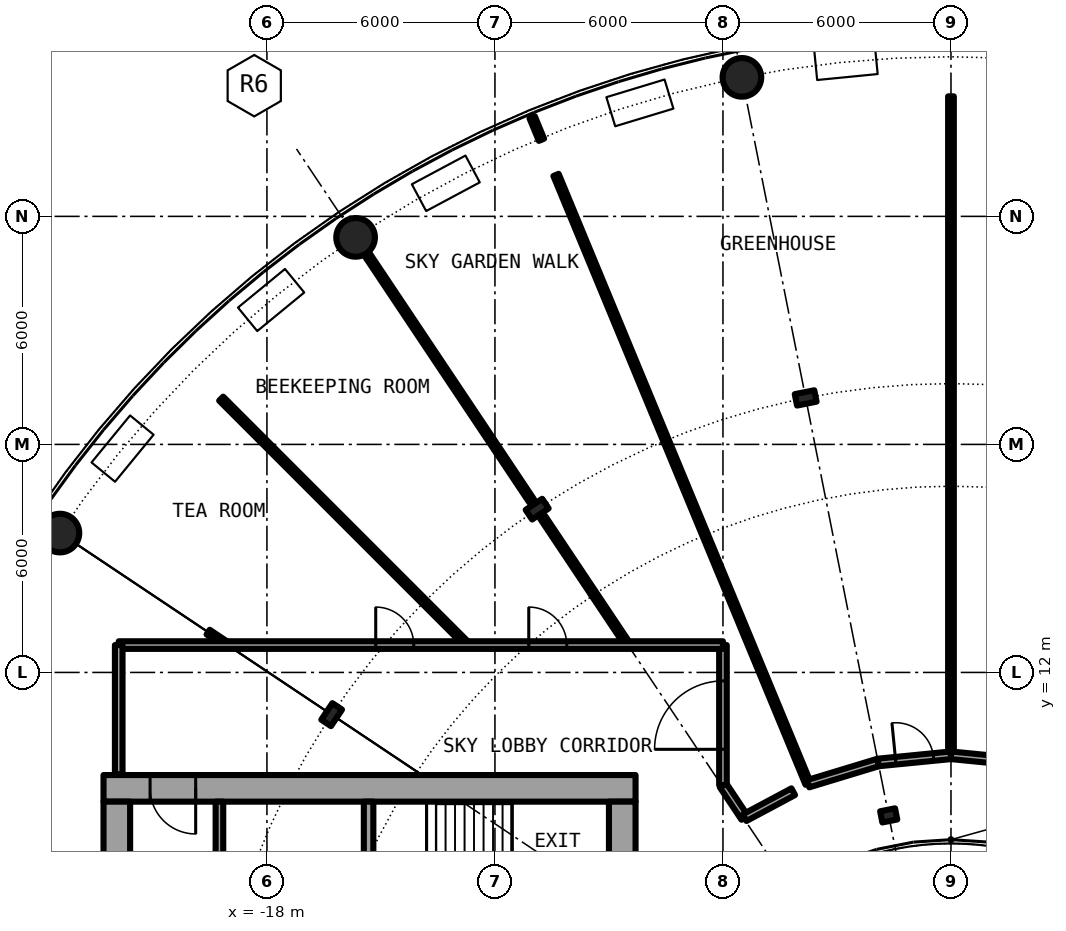
"""IFC4 building model, lengths in metres.
Left out: names, types, materials, properties, quantities, classifications, styles, units other than length and angle.
Written with IfcOpenShell. Run it as: python <this file> out.ifc"""

import sys

from ifc_helpers import new_model, si_unit, direction, frame, frame_2d, origin, origin_2d, place, context, subcontext, project, spatial, rectangle, hollow_circle, i_section, extrude, element, fill, save


model = new_model("IFC4")
c1 = context("Model", 3, precision=1e-05, world=origin(), true_north=direction((0.0, 1.0)))
c2 = subcontext(c1, "Body", "Model", "MODEL_VIEW")
j1 = project(units=[si_unit("LENGTHUNIT", "METRE"), si_unit("PLANEANGLEUNIT", "RADIAN")], contexts=[c1])
p1 = place(None, origin())
s1 = spatial("IfcSite", under=j1, at=p1, CompositionType="ELEMENT")
p2 = place(p1, origin())
s2 = spatial("IfcBuilding", under=s1, at=p2, CompositionType="ELEMENT")
p3 = place(p2, frame((0.0, 0.0, 97.15)))
s3 = spatial("IfcBuildingStorey", under=s2, at=p3, CompositionType="ELEMENT", Elevation=97.15)
for number, where, z_axis, x_axis in (
    (1, (-5.501, 27.658, 0.0), (0.0, 0.0, 1.0), (1.0, 0.0, 0.0)),
    (2, (-15.667, 23.448, 0.0), (0.0, 0.0, 1.0), (1.0, 0.0, 0.0)),
    (3, (-23.448, 15.667, 0.0), (0.0, 0.0, 1.0), (1.0, 0.0, 0.0)),
):
    element("IfcColumn", number, at=place(p3, frame(where, z_axis=z_axis, x_axis=x_axis)), inside=s3, PredefinedType="COLUMN", context=c2, shape_type="SweptSolid", body=[
        extrude(hollow_circle(Radius=0.508, WallThickness=0.04, at=origin_2d()), origin(), (0.0, 0.0, 1.0), 6.1),
    ])
for number, where, z_axis, x_axis in (
    (4, (-3.824, 19.223, 0.0), (0.0, 0.0, 1.0), (-0.195, 0.981, 0.0)),
    (5, (-10.889, 16.297, 0.0), (0.0, 0.0, 1.0), (-0.556, 0.831, 0.0)),
    (6, (-16.297, 10.889, 0.0), (0.0, 0.0, 1.0), (-0.831, 0.556, 0.0)),
):
    element("IfcColumn", number, at=place(p3, frame(where, z_axis=z_axis, x_axis=x_axis)), inside=s3, PredefinedType="COLUMN", context=c2, shape_type="SweptSolid", body=[
        extrude(i_section(OverallWidth=0.306, OverallDepth=0.524, WebThickness=0.021, FlangeThickness=0.04, FilletRadius=0.027, at=origin_2d()), origin(), (0.0, 0.0, 1.0), 6.1),
    ])
p4 = place(p3, frame((-1.639, 8.239, 0.0), z_axis=(0.0, 0.0, 1.0), x_axis=(-0.195090322016, 0.980785280403, 0.0)))
e7 = element("IfcColumn", 7, at=p4, inside=s3, PredefinedType="COLUMN", context=c2, shape_type="SweptSolid", body=[
    extrude(i_section(OverallWidth=0.3, OverallDepth=0.4, WebThickness=0.013, FlangeThickness=0.024, FilletRadius=0.027, at=origin_2d()), origin(), (0.0, 0.0, 1.0), 6.1),
])
p5 = place(p3, frame((-8.3, 8.95, 0.0), z_axis=(0.0, 0.0, 1.0), x_axis=(-1.0, 0.0, 0.0)))
e8 = element("IfcWall", 8, at=p5, inside=s3, PredefinedType="SHEAR", context=c2, shape_type="SweptSolid", body=[
    extrude(rectangle(XDim=14.0, YDim=0.7, at=frame_2d((7.0, 0.0))), origin(), (0.0, 0.0, 1.0), 6.1),
])
p6 = place(p5, frame((11.575, 0.0, 0.0)))
e9 = element("IfcOpeningElement", 9, at=p6, cuts=e8, PredefinedType="OPENING", context=c2, shape_type="SweptSolid", body=[
    extrude(rectangle(XDim=1.2, YDim=2.3, at=frame_2d((0.6, 1.15))), frame((0.0, 0.36, 0.0), z_axis=(0.0, -1.0, 0.0), x_axis=(1.0, 0.0, 0.0)), (0.0, 0.0, 1.0), 0.72),
])
p7 = place(p3, frame((-21.95, -8.6, 0.0), z_axis=(0.0, 0.0, 1.0), x_axis=(0.0, 1.0, 0.0)))
e10 = element("IfcWall", 10, at=p7, inside=s3, PredefinedType="SHEAR", context=c2, shape_type="SweptSolid", body=[
    extrude(rectangle(XDim=17.2, YDim=0.7, at=frame_2d((8.6, 0.0))), origin(), (0.0, 0.0, 1.0), 6.1),
])
p8 = place(p7, frame((7.4, 0.0, 0.0)))
e11 = element("IfcOpeningElement", 11, at=p8, cuts=e10, PredefinedType="OPENING", context=c2, shape_type="SweptSolid", body=[
    extrude(rectangle(XDim=2.4, YDim=2.3, at=frame_2d((1.2, 1.15))), frame((0.0, 0.36, 0.0), z_axis=(0.0, -1.0, 0.0), x_axis=(1.0, 0.0, 0.0)), (0.0, 0.0, 1.0), 0.72),
])
p9 = place(p3, frame((-8.65, 8.6, 0.0), z_axis=(0.0, 0.0, 1.0), x_axis=(0.0, -1.0, 0.0)))
e12 = element("IfcWall", 12, at=p9, inside=s3, PredefinedType="SHEAR", context=c2, shape_type="SweptSolid", body=[
    extrude(rectangle(XDim=17.2, YDim=0.7, at=frame_2d((8.6, 0.0))), origin(), (0.0, 0.0, 1.0), 6.1),
])
p10 = place(p9, frame((7.4, 0.0, 0.1)))
e13 = element("IfcOpeningElement", 13, at=p10, cuts=e12, PredefinedType="OPENING", context=c2, shape_type="SweptSolid", body=[
    extrude(rectangle(XDim=2.4, YDim=2.2, at=frame_2d((1.2, 1.1))), frame((0.0, 0.36, 0.0), z_axis=(0.0, -1.0, 0.0), x_axis=(1.0, 0.0, 0.0)), (0.0, 0.0, 1.0), 0.72),
])
p11 = place(p3, frame((-15.325, 8.6, 0.0), z_axis=(0.0, 0.0, 1.0), x_axis=(0.0, -1.0, 0.0)))
e14 = element("IfcWall", 14, at=p11, inside=s3, PredefinedType="SHEAR", context=c2, shape_type="SweptSolid", body=[
    extrude(rectangle(XDim=3.95, YDim=0.25, at=frame_2d((1.975, 0.0))), origin(), (0.0, 0.0, 1.0), 6.1),
])
p12 = place(p11, frame((2.025, 0.0, 0.0)))
e15 = element("IfcOpeningElement", 15, at=p12, cuts=e14, PredefinedType="OPENING", context=c2, shape_type="SweptSolid", body=[
    extrude(rectangle(XDim=1.2, YDim=2.3, at=frame_2d((0.6, 1.15))), frame((0.0, 0.135, 0.0), z_axis=(0.0, -1.0, 0.0), x_axis=(1.0, 0.0, 0.0)), (0.0, 0.0, 1.0), 0.27),
])
p13 = place(p3, frame((-19.25, 8.6, 0.0), z_axis=(0.0, 0.0, 1.0), x_axis=(0.0, -1.0, 0.0)))
e16 = element("IfcWall", 16, at=p13, inside=s3, PredefinedType="SOLIDWALL", context=c2, shape_type="SweptSolid", body=[
    extrude(rectangle(XDim=7.025, YDim=0.2, at=frame_2d((3.513, 0.0))), origin(), (0.0, 0.0, 1.0), 5.7),
])
p14 = place(p13, frame((2.35, 0.0, 0.0)))
e17 = element("IfcOpeningElement", 17, at=p14, cuts=e16, PredefinedType="OPENING", context=c2, shape_type="SweptSolid", body=[
    extrude(rectangle(XDim=1.1, YDim=2.3, at=frame_2d((0.55, 1.15))), frame((0.0, 0.11, 0.0), z_axis=(0.0, -1.0, 0.0), x_axis=(1.0, 0.0, 0.0)), (0.0, 0.0, 1.0), 0.22),
])
p15 = place(p3, frame((-19.547, 13.061, 0.0), z_axis=(0.0, 0.0, 1.0), x_axis=(0.83125359921, -0.555893383483, 0.0)))
e18 = element("IfcWall", 18, at=p15, inside=s3, PredefinedType="PARTITIONING", context=c2, shape_type="SweptSolid", body=[
    extrude(rectangle(XDim=0.614, YDim=0.15, at=frame_2d((0.307, 0.0))), origin(), (0.0, 0.0, 1.0), 4.88),
])
p16 = place(p3, frame((-19.204, 19.204, 0.0), z_axis=(0.0, 0.0, 1.0), x_axis=(0.707106781187, -0.707106781187, 0.0)))
e19 = element("IfcWall", 19, at=p16, inside=s3, PredefinedType="PARTITIONING", context=c2, shape_type="SweptSolid", body=[
    extrude(rectangle(XDim=9.17, YDim=0.15, at=frame_2d((4.585, 0.0))), origin(), (0.0, 0.0, 1.0), 5.7),
])
p17 = place(p3, frame((-15.39, 23.033, 0.0), z_axis=(0.0, 0.0, 1.0), x_axis=(0.555547985169, -0.83148447741, 0.0)))
e20 = element("IfcWall", 20, at=p17, inside=s3, PredefinedType="PARTITIONING", context=c2, shape_type="SweptSolid", body=[
    extrude(rectangle(XDim=7.839, YDim=0.15, at=frame_2d((3.919, 0.0))), origin(), (0.0, 0.0, 1.0), 5.7),
])
p18 = place(p3, frame((-11.021, 26.608, 0.0), z_axis=(0.0, 0.0, 1.0), x_axis=(0.38199330966, -0.92416508881, 0.0)))
e21 = element("IfcWall", 21, at=p18, inside=s3, PredefinedType="PARTITIONING", context=c2, shape_type="SweptSolid", body=[
    extrude(rectangle(XDim=0.642, YDim=0.15, at=frame_2d((0.321, 0.0))), origin(), (0.0, 0.0, 1.0), 5.7),
])
p19 = place(p3, frame((-10.743, 16.079, 0.0), z_axis=(0.0, 0.0, 1.0), x_axis=(0.555467032474, -0.831538559439, 0.0)))
e22 = element("IfcWall", 22, at=p19, inside=s3, PredefinedType="PARTITIONING", context=c2, shape_type="SweptSolid", body=[
    extrude(rectangle(XDim=4.04, YDim=0.15, at=frame_2d((2.02, 0.0))), origin(), (0.0, 0.0, 1.0), 5.7),
])
p20 = place(p3, frame((-10.393, 25.091, 0.0), z_axis=(0.0, 0.0, 1.0), x_axis=(0.382668905709, -0.923885549516, 0.0)))
e23 = element("IfcWall", 23, at=p20, inside=s3, PredefinedType="PARTITIONING", context=c2, shape_type="SweptSolid", body=[
    extrude(rectangle(XDim=17.339, YDim=0.15, at=frame_2d((8.669, 0.0))), origin(), (0.0, 0.0, 1.0), 5.7),
])
p21 = place(p3, frame((0.0, 9.82, 0.0), z_axis=(0.0, 0.0, 1.0), x_axis=(0.0, 1.0, 0.0)))
e24 = element("IfcWall", 24, at=p21, inside=s3, PredefinedType="PARTITIONING", context=c2, shape_type="SweptSolid", body=[
    extrude(rectangle(XDim=17.338, YDim=0.15, at=frame_2d((8.669, 0.0))), origin(), (0.0, 0.0, 1.0), 5.7),
])
p22 = place(p3, frame((-6.0, 9.034, 0.0), z_axis=(0.0, 0.0, 1.0), x_axis=(0.555412364489, -0.831575075007, 0.0)))
e25 = element("IfcWall", 25, at=p22, inside=s3, PredefinedType="PARTITIONING", context=c2, shape_type="SweptSolid", body=[
    extrude(rectangle(XDim=1.028, YDim=0.2, at=frame_2d((0.514, 0.0))), origin(), (0.0, 0.0, 1.0), 5.7),
])
p23 = place(p3, frame((-6.0, 9.034, 0.0), z_axis=(0.0, 0.0, 1.0), x_axis=(0.0, 1.0, 0.0)))
e26 = element("IfcWall", 26, at=p23, inside=s3, PredefinedType="PARTITIONING", context=c2, shape_type="SweptSolid", body=[
    extrude(rectangle(XDim=3.686, YDim=0.2, at=frame_2d((1.843, 0.0))), origin(), (0.0, 0.0, 1.0), 5.7),
])
p24 = place(p23, frame((0.943, 0.0, 0.0)))
e27 = element("IfcOpeningElement", 27, at=p24, cuts=e26, PredefinedType="OPENING", context=c2, shape_type="SweptSolid", body=[
    extrude(rectangle(XDim=1.8, YDim=2.3, at=frame_2d((0.9, 1.15))), frame((0.0, 0.11, 0.0), z_axis=(0.0, -1.0, 0.0), x_axis=(1.0, 0.0, 0.0)), (0.0, 0.0, 1.0), 0.22),
])
p25 = place(p3, frame((-5.429, 8.179, 0.0), z_axis=(0.0, 0.0, 1.0), x_axis=(0.88193287619, 0.471375011954, 0.0)))
e28 = element("IfcWall", 28, at=p25, inside=s3, PredefinedType="PARTITIONING", context=c2, shape_type="SweptSolid", body=[
    extrude(rectangle(XDim=1.449, YDim=0.2, at=frame_2d((0.725, 0.0))), origin(), (0.0, 0.0, 1.0), 5.7),
])
p26 = place(p3, frame((-3.758, 9.072, 0.0), z_axis=(0.0, 0.0, 1.0), x_axis=(0.956896312675, 0.29042976223, 0.0)))
e29 = element("IfcWall", 29, at=p26, inside=s3, PredefinedType="PARTITIONING", context=c2, shape_type="SweptSolid", body=[
    extrude(rectangle(XDim=1.925, YDim=0.2, at=frame_2d((0.962, 0.0))), origin(), (0.0, 0.0, 1.0), 5.7),
])
p27 = place(p3, frame((-1.916, 9.631, 0.0), z_axis=(0.0, 0.0, 1.0), x_axis=(0.995171860647, 0.098147683504, 0.0)))
e30 = element("IfcWall", 30, at=p27, inside=s3, PredefinedType="PARTITIONING", context=c2, shape_type="SweptSolid", body=[
    extrude(rectangle(XDim=1.925, YDim=0.2, at=frame_2d((0.963, 0.0))), origin(), (0.0, 0.0, 1.0), 5.7),
])
p28 = place(p27, frame((0.463, 0.0, 0.0)))
e31 = element("IfcOpeningElement", 31, at=p28, cuts=e30, PredefinedType="OPENING", context=c2, shape_type="SweptSolid", body=[
    extrude(rectangle(XDim=1.0, YDim=2.3, at=frame_2d((0.5, 1.15))), frame((0.0, 0.11, 0.0), z_axis=(0.0, -1.0, 0.0), x_axis=(1.0, 0.0, 0.0)), (0.0, 0.0, 1.0), 0.22),
])
p29 = place(p3, frame((0.0, 9.82, 0.0), z_axis=(0.0, 0.0, 1.0), x_axis=(0.995171860647, -0.098147683504, 0.0)))
e32 = element("IfcWall", 32, at=p29, inside=s3, PredefinedType="PARTITIONING", context=c2, shape_type="SweptSolid", body=[
    extrude(rectangle(XDim=1.925, YDim=0.2, at=frame_2d((0.963, 0.0))), origin(), (0.0, 0.0, 1.0), 5.7),
])
p30 = place(p3, frame((-21.9, 12.72, 0.0), z_axis=(0.0, 0.0, 1.0), x_axis=(1.0, 0.0, 0.0)))
e33 = element("IfcWall", 33, at=p30, inside=s3, PredefinedType="PARTITIONING", context=c2, shape_type="SweptSolid", body=[
    extrude(rectangle(XDim=15.9, YDim=0.2, at=frame_2d((7.95, 0.0))), origin(), (0.0, 0.0, 1.0), 5.7),
])
p31 = place(p30, frame((10.79, 0.0, 0.0)))
e34 = element("IfcOpeningElement", 34, at=p31, cuts=e33, PredefinedType="OPENING", context=c2, shape_type="SweptSolid", body=[
    extrude(rectangle(XDim=1.0, YDim=2.3, at=frame_2d((0.5, 1.15))), frame((0.0, 0.11, 0.0), z_axis=(0.0, -1.0, 0.0), x_axis=(1.0, 0.0, 0.0)), (0.0, 0.0, 1.0), 0.22),
])
p32 = place(p30, frame((6.763, 0.0, 0.0)))
e35 = element("IfcOpeningElement", 35, at=p32, cuts=e33, PredefinedType="OPENING", context=c2, shape_type="SweptSolid", body=[
    extrude(rectangle(XDim=1.0, YDim=2.3, at=frame_2d((0.5, 1.15))), frame((0.0, 0.11, 0.0), z_axis=(0.0, -1.0, 0.0), x_axis=(1.0, 0.0, 0.0)), (0.0, 0.0, 1.0), 0.22),
])
p33 = place(p3, frame((-21.9, 9.32, 0.0), z_axis=(0.0, 0.0, 1.0), x_axis=(0.0, 1.0, 0.0)))
e36 = element("IfcWall", 36, at=p33, inside=s3, PredefinedType="PARTITIONING", context=c2, shape_type="SweptSolid", body=[
    extrude(rectangle(XDim=3.4, YDim=0.2, at=frame_2d((1.7, 0.0))), origin(), (0.0, 0.0, 1.0), 5.7),
])
p34 = place(p6, origin())
e37 = element("IfcDoor", 37, at=p34, inside=s3, OperationType="SINGLE_SWING_LEFT", PredefinedType="DOOR", context=c2, shape_type="SweptSolid", body=[
    extrude(rectangle(XDim=1.2, YDim=2.3, at=frame_2d((0.6, 1.15))), frame((0.0, 0.025, 0.0), z_axis=(0.0, -1.0, 0.0), x_axis=(1.0, 0.0, 0.0)), (0.0, 0.0, 1.0), 0.05),
])
fill(e9, e37)
p35 = place(p28, origin())
e38 = element("IfcDoor", 38, at=p35, inside=s3, OperationType="SINGLE_SWING_LEFT", PredefinedType="DOOR", context=c2, shape_type="SweptSolid", body=[
    extrude(rectangle(XDim=1.0, YDim=2.3, at=frame_2d((0.5, 1.15))), frame((0.0, 0.025, 0.0), z_axis=(0.0, -1.0, 0.0), x_axis=(1.0, 0.0, 0.0)), (0.0, 0.0, 1.0), 0.05),
])
fill(e31, e38)
p36 = place(p31, origin())
e39 = element("IfcDoor", 39, at=p36, inside=s3, OperationType="SINGLE_SWING_RIGHT", PredefinedType="DOOR", context=c2, shape_type="SweptSolid", body=[
    extrude(rectangle(XDim=1.0, YDim=2.3, at=frame_2d((0.5, 1.15))), frame((0.0, 0.025, 0.0), z_axis=(0.0, -1.0, 0.0), x_axis=(1.0, 0.0, 0.0)), (0.0, 0.0, 1.0), 0.05),
])
fill(e34, e39)
p37 = place(p32, origin())
e40 = element("IfcDoor", 40, at=p37, inside=s3, OperationType="SINGLE_SWING_LEFT", PredefinedType="DOOR", context=c2, shape_type="SweptSolid", body=[
    extrude(rectangle(XDim=1.0, YDim=2.3, at=frame_2d((0.5, 1.15))), frame((0.0, 0.025, 0.0), z_axis=(0.0, -1.0, 0.0), x_axis=(1.0, 0.0, 0.0)), (0.0, 0.0, 1.0), 0.05),
])
fill(e35, e40)
p38 = place(p24, origin())
e41 = element("IfcDoor", 41, at=p38, inside=s3, OperationType="DOUBLE_DOOR_SINGLE_SWING", PredefinedType="DOOR", context=c2, shape_type="SweptSolid", body=[
    extrude(rectangle(XDim=1.8, YDim=2.3, at=frame_2d((0.9, 1.15))), frame((0.0, 0.025, 0.0), z_axis=(0.0, -1.0, 0.0), x_axis=(1.0, 0.0, 0.0)), (0.0, 0.0, 1.0), 0.05),
])
fill(e27, e41)
save(model, sys.argv[1])
